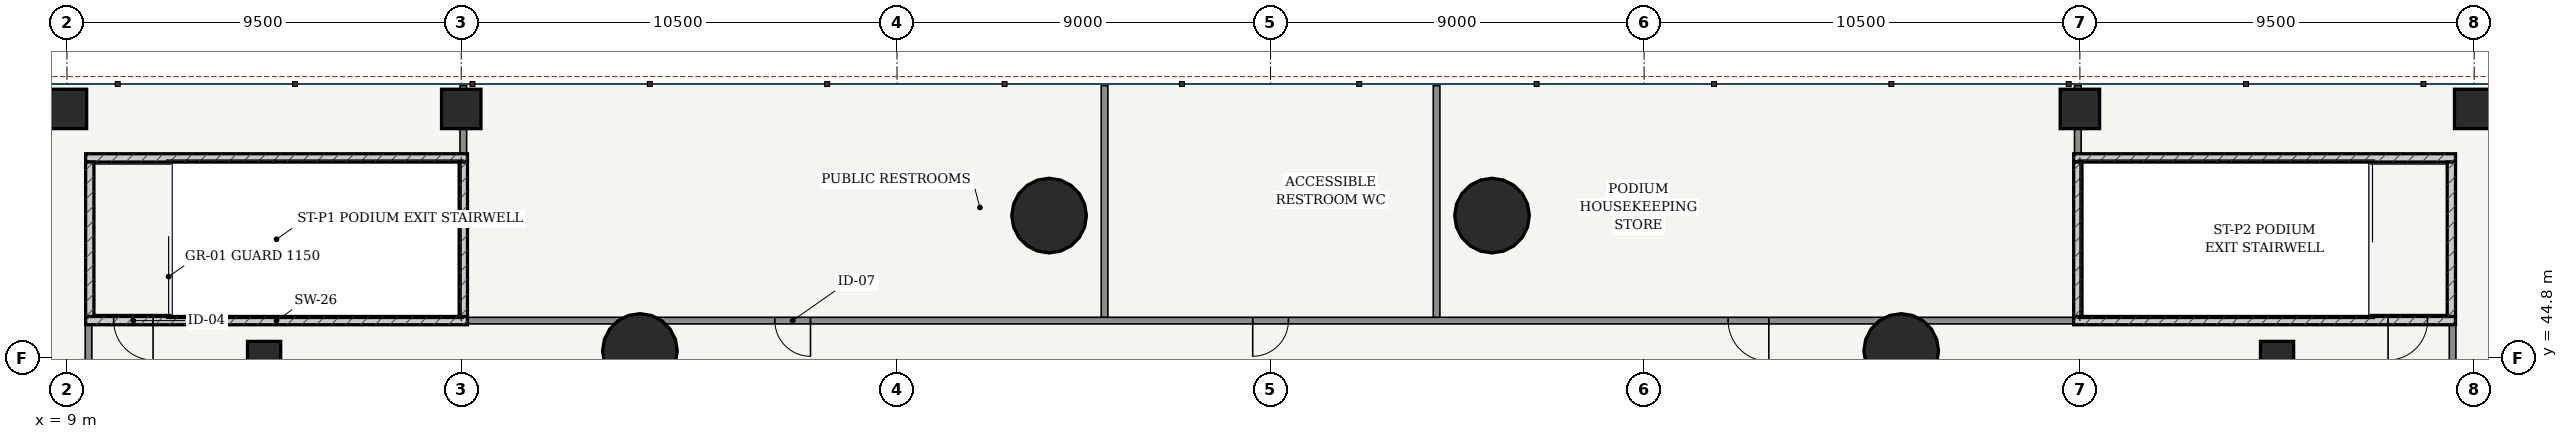
"""IFC4 building model, lengths in metres.
Left out: names, types, materials, properties, quantities, classifications, styles, units other than length and angle.
Written with IfcOpenShell. Run it as: python <this file> out.ifc"""

import sys

from ifc_helpers import new_model, si_unit, direction, frame, frame_2d, origin, origin_2d, place, context, subcontext, project, spatial, rectangle, hollow_circle, extrude, source, transform, mapped, element, fill, save


model = new_model("IFC4")
c1 = context("Model", 3, precision=1e-05, world=origin(), true_north=direction((-0.2419218956, 0.970295726276)))
c2 = subcontext(c1, "Body", "Model", "MODEL_VIEW")
j1 = project(units=[si_unit("LENGTHUNIT", "METRE"), si_unit("PLANEANGLEUNIT", "RADIAN")], contexts=[c1])
p1 = place(None, origin())
s1 = spatial("IfcSite", under=j1, at=p1, CompositionType="ELEMENT")
p2 = place(p1, origin())
s2 = spatial("IfcBuilding", under=s1, at=p2, CompositionType="ELEMENT")
p3 = place(p2, frame((0.0, 0.0, 18.9)))
s3 = spatial("IfcBuildingStorey", under=s2, at=p3, CompositionType="ELEMENT", Elevation=18.9)
p4 = place(p3, frame((9.45, 45.7, 0.0), z_axis=(0.0, 0.0, 1.0), x_axis=(1.0, 0.0, 0.0)))
e1 = element("IfcWall", 1, at=p4, inside=s3, PredefinedType="SOLIDWALL", context=c2, shape_type="SweptSolid", body=[
    extrude(rectangle(XDim=9.2, YDim=0.2, at=frame_2d((4.6, 0.0))), origin(), (0.0, 0.0, 1.0), 4.82),
])
p5 = place(p4, frame((0.675, 0.0, 0.0)))
e2 = element("IfcOpeningElement", 2, at=p5, cuts=e1, PredefinedType="OPENING", context=c2, shape_type="SweptSolid", body=[
    extrude(rectangle(XDim=0.95, YDim=2.15, at=frame_2d((0.475, 1.075))), frame((0.0, 0.11, 0.0), z_axis=(0.0, -1.0, 0.0), x_axis=(1.0, 0.0, 0.0)), (0.0, 0.0, 1.0), 0.22),
])
p6 = place(p3, frame((9.45, 49.62, 0.0), z_axis=(0.0, 0.0, 1.0), x_axis=(1.0, 0.0, 0.0)))
e3 = element("IfcWall", 3, at=p6, inside=s3, PredefinedType="SOLIDWALL", context=c2, shape_type="SweptSolid", body=[
    extrude(rectangle(XDim=9.2, YDim=0.2, at=frame_2d((4.6, 0.0))), origin(), (0.0, 0.0, 1.0), 4.82),
])
for number, where, z_axis, x_axis in (
    (4, (9.55, 45.8, 0.0), (0.0, 0.0, 1.0), (0.0, 1.0, 0.0)),
    (5, (18.55, 45.8, 0.0), (0.0, 0.0, 1.0), (0.0, 1.0, 0.0)),
):
    element("IfcWall", number, at=place(p3, frame(where, z_axis=z_axis, x_axis=x_axis)), inside=s3, PredefinedType="SOLIDWALL", context=c2, shape_type="SweptSolid", body=[
        extrude(rectangle(XDim=3.72, YDim=0.2, at=frame_2d((1.86, 0.0))), origin(), (0.0, 0.0, 1.0), 4.82),
    ])
p7 = place(p3, frame((57.35, 45.7, 0.0), z_axis=(0.0, 0.0, 1.0), x_axis=(1.0, 0.0, 0.0)))
e6 = element("IfcWall", 6, at=p7, inside=s3, PredefinedType="SOLIDWALL", context=c2, shape_type="SweptSolid", body=[
    extrude(rectangle(XDim=9.2, YDim=0.2, at=frame_2d((4.6, 0.0))), origin(), (0.0, 0.0, 1.0), 4.82),
])
p8 = place(p7, frame((7.575, 0.0, 0.0)))
e7 = element("IfcOpeningElement", 7, at=p8, cuts=e6, PredefinedType="OPENING", context=c2, shape_type="SweptSolid", body=[
    extrude(rectangle(XDim=0.95, YDim=2.15, at=frame_2d((0.475, 1.075))), frame((0.0, 0.11, 0.0), z_axis=(0.0, -1.0, 0.0), x_axis=(1.0, 0.0, 0.0)), (0.0, 0.0, 1.0), 0.22),
])
p9 = place(p3, frame((57.35, 49.62, 0.0), z_axis=(0.0, 0.0, 1.0), x_axis=(1.0, 0.0, 0.0)))
e8 = element("IfcWall", 8, at=p9, inside=s3, PredefinedType="SOLIDWALL", context=c2, shape_type="SweptSolid", body=[
    extrude(rectangle(XDim=9.2, YDim=0.2, at=frame_2d((4.6, 0.0))), origin(), (0.0, 0.0, 1.0), 4.82),
])
for number, where, z_axis, x_axis in (
    (9, (57.45, 45.8, 0.0), (0.0, 0.0, 1.0), (0.0, 1.0, 0.0)),
    (10, (66.45, 45.8, 0.0), (0.0, 0.0, 1.0), (0.0, 1.0, 0.0)),
):
    element("IfcWall", number, at=place(p3, frame(where, z_axis=z_axis, x_axis=x_axis)), inside=s3, PredefinedType="SOLIDWALL", context=c2, shape_type="SweptSolid", body=[
        extrude(rectangle(XDim=3.72, YDim=0.2, at=frame_2d((1.86, 0.0))), origin(), (0.0, 0.0, 1.0), 4.82),
    ])
for number, where, z_axis, x_axis in (
    (11, (53.195, 44.968, 0.0), (0.0, 0.0, 1.0), (1.0, 0.0, 0.0)),
    (12, (43.336, 48.23, 0.0), (0.0, 0.0, 1.0), (1.0, 0.0, 0.0)),
    (13, (32.664, 48.23, 0.0), (0.0, 0.0, 1.0), (1.0, 0.0, 0.0)),
    (14, (22.805, 44.968, 0.0), (0.0, 0.0, 1.0), (1.0, 0.0, 0.0)),
):
    element("IfcColumn", number, at=place(p3, frame(where, z_axis=z_axis, x_axis=x_axis)), inside=s3, PredefinedType="COLUMN", context=c2, shape_type="SweptSolid", body=[
        extrude(hollow_circle(Radius=0.9, WallThickness=0.055, at=origin_2d()), origin(), (0.0, 0.0, 1.0), 5.1),
    ])
for number, where, z_axis, x_axis in (
    (15, (9.0, 50.8, 0.0), (0.0, 0.0, 1.0), (1.0, 0.0, 0.0)),
    (16, (18.5, 50.8, 0.0), (0.0, 0.0, 1.0), (1.0, 0.0, 0.0)),
    (17, (57.5, 50.8, 0.0), (0.0, 0.0, 1.0), (1.0, 0.0, 0.0)),
    (18, (67.0, 50.8, 0.0), (0.0, 0.0, 1.0), (1.0, 0.0, 0.0)),
):
    element("IfcColumn", number, at=place(p3, frame(where, z_axis=z_axis, x_axis=x_axis)), inside=s3, PredefinedType="COLUMN", context=c2, shape_type="SweptSolid", body=[
        extrude(rectangle(XDim=0.95, YDim=0.95, at=origin_2d()), origin(), (0.0, 0.0, 1.0), 5.1),
    ])
for number, where, z_axis, x_axis in (
    (19, (13.75, 44.8, -0.45), (0.0, 0.0, 1.0), (1.0, 0.0, 0.0)),
    (20, (62.25, 44.8, -0.45), (0.0, 0.0, 1.0), (1.0, 0.0, 0.0)),
):
    element("IfcColumn", number, at=place(p3, frame(where, z_axis=z_axis, x_axis=x_axis)), inside=s3, PredefinedType="COLUMN", context=c2, shape_type="SweptSolid", body=[
        extrude(rectangle(XDim=0.8, YDim=0.8, at=origin_2d()), origin(), (0.0, 0.0, 1.0), 5.55),
    ])
for number, where, z_axis, x_axis in (
    (21, (9.52, 36.92, 0.0), (0.0, 0.0, 1.0), (0.0, 1.0, 0.0)),
    (22, (66.48, 36.92, 0.0), (0.0, 0.0, 1.0), (0.0, 1.0, 0.0)),
):
    element("IfcWall", number, at=place(p3, frame(where, z_axis=z_axis, x_axis=x_axis)), inside=s3, PredefinedType="PARTITIONING", context=c2, shape_type="SweptSolid", body=[
        extrude(rectangle(XDim=8.78, YDim=0.16, at=frame_2d((4.39, 0.0))), origin(), (0.0, 0.0, 1.0), 4.82),
    ])
p10 = place(p3, frame((18.55, 45.7, 0.0), z_axis=(0.0, 0.0, 1.0), x_axis=(1.0, 0.0, 0.0)))
e23 = element("IfcWall", 23, at=p10, inside=s3, PredefinedType="PARTITIONING", context=c2, shape_type="SweptSolid", body=[
    extrude(rectangle(XDim=38.9, YDim=0.16, at=frame_2d((19.45, 0.0))), origin(), (0.0, 0.0, 1.0), 4.188),
])
p11 = place(p10, frame((7.505, 0.0, 0.0)))
e24 = element("IfcOpeningElement", 24, at=p11, cuts=e23, PredefinedType="OPENING", context=c2, shape_type="SweptSolid", body=[
    extrude(rectangle(XDim=0.86, YDim=2.1, at=frame_2d((0.43, 1.05))), frame((0.0, 0.09, 0.0), z_axis=(0.0, -1.0, 0.0), x_axis=(1.0, 0.0, 0.0)), (0.0, 0.0, 1.0), 0.18),
])
p12 = place(p10, frame((19.02, 0.0, 0.0)))
e25 = element("IfcOpeningElement", 25, at=p12, cuts=e23, PredefinedType="OPENING", context=c2, shape_type="SweptSolid", body=[
    extrude(rectangle(XDim=0.86, YDim=2.1, at=frame_2d((0.43, 1.05))), frame((0.0, 0.09, 0.0), z_axis=(0.0, -1.0, 0.0), x_axis=(1.0, 0.0, 0.0)), (0.0, 0.0, 1.0), 0.18),
])
p13 = place(p10, frame((30.475, 0.0, 0.0)))
e26 = element("IfcOpeningElement", 26, at=p13, cuts=e23, PredefinedType="OPENING", context=c2, shape_type="SweptSolid", body=[
    extrude(rectangle(XDim=0.98, YDim=2.2, at=frame_2d((0.49, 1.1))), frame((0.0, 0.09, 0.0), z_axis=(0.0, -1.0, 0.0), x_axis=(1.0, 0.0, 0.0)), (0.0, 0.0, 1.0), 0.18),
])
for number, where, z_axis, x_axis in (
    (27, (34.0, 45.782, 0.0), (0.0, 0.0, 1.0), (0.0, 1.0, 0.0)),
    (28, (42.0, 45.782, 0.0), (0.0, 0.0, 1.0), (0.0, 1.0, 0.0)),
):
    element("IfcWall", number, at=place(p3, frame(where, z_axis=z_axis, x_axis=x_axis)), inside=s3, PredefinedType="PARTITIONING", context=c2, shape_type="SweptSolid", body=[
        extrude(rectangle(XDim=5.578, YDim=0.16, at=frame_2d((2.789, 0.0))), origin(), (0.0, 0.0, 1.0), 4.262),
    ])
for number, where, z_axis, x_axis in (
    (29, (18.55, 49.722, 0.0), (0.0, 0.0, 1.0), (0.0, 1.0, 0.0)),
    (30, (57.45, 49.722, 0.0), (0.0, 0.0, 1.0), (0.0, 1.0, 0.0)),
):
    element("IfcWall", number, at=place(p3, frame(where, z_axis=z_axis, x_axis=x_axis)), inside=s3, PredefinedType="PARTITIONING", context=c2, shape_type="SweptSolid", body=[
        extrude(rectangle(XDim=1.638, YDim=0.16, at=frame_2d((0.819, 0.0))), origin(), (0.0, 0.0, 1.0), 3.855),
    ])
m1 = source(origin(), c2, "Body", "SweptSolid", [
    extrude(rectangle(XDim=0.95, YDim=2.15, at=frame_2d((0.475, 1.075))), frame((0.0, 0.025, 0.0), z_axis=(0.0, -1.0, 0.0), x_axis=(1.0, 0.0, 0.0)), (0.0, 0.0, 1.0), 0.05),
])
p14 = place(p5, frame((0.95, 0.0, 0.0), z_axis=(0.0, 0.0, 1.0), x_axis=(-1.0, 0.0, 0.0)))
e31 = element("IfcDoor", 31, at=p14, inside=s3, OperationType="SINGLE_SWING_LEFT", PredefinedType="DOOR", context=c2, shape_type="MappedRepresentation", body=[
    mapped(m1, transform((0.0, 0.0, 0.0), scale=1.0)),
])
fill(e2, e31)
p15 = place(p8, frame((0.95, 0.0, 0.0), z_axis=(0.0, 0.0, 1.0), x_axis=(-1.0, 0.0, 0.0)))
e32 = element("IfcDoor", 32, at=p15, inside=s3, OperationType="SINGLE_SWING_RIGHT", PredefinedType="DOOR", context=c2, shape_type="MappedRepresentation", body=[
    mapped(m1, transform((0.0, 0.0, 0.0), scale=1.0)),
])
fill(e7, e32)
m2 = source(origin(), c2, "Body", "SweptSolid", [
    extrude(rectangle(XDim=0.86, YDim=2.1, at=frame_2d((0.43, 1.05))), frame((0.0, 0.025, 0.0), z_axis=(0.0, -1.0, 0.0), x_axis=(1.0, 0.0, 0.0)), (0.0, 0.0, 1.0), 0.05),
])
p16 = place(p11, frame((0.86, 0.0, 0.0), z_axis=(0.0, 0.0, 1.0), x_axis=(-1.0, 0.0, 0.0)))
e33 = element("IfcDoor", 33, at=p16, inside=s3, OperationType="SINGLE_SWING_LEFT", PredefinedType="DOOR", context=c2, shape_type="MappedRepresentation", body=[
    mapped(m2, transform((0.0, 0.0, 0.0), scale=1.0)),
])
fill(e24, e33)
p17 = place(p12, frame((0.86, 0.0, 0.0), z_axis=(0.0, 0.0, 1.0), x_axis=(-1.0, 0.0, 0.0)))
e34 = element("IfcDoor", 34, at=p17, inside=s3, OperationType="SINGLE_SWING_RIGHT", PredefinedType="DOOR", context=c2, shape_type="MappedRepresentation", body=[
    mapped(m2, transform((0.0, 0.0, 0.0), scale=1.0)),
])
fill(e25, e34)
m3 = source(origin(), c2, "Body", "SweptSolid", [
    extrude(rectangle(XDim=0.98, YDim=2.2, at=frame_2d((0.49, 1.1))), frame((0.0, 0.025, 0.0), z_axis=(0.0, -1.0, 0.0), x_axis=(1.0, 0.0, 0.0)), (0.0, 0.0, 1.0), 0.05),
])
p18 = place(p13, frame((0.98, 0.0, 0.0), z_axis=(0.0, 0.0, 1.0), x_axis=(-1.0, 0.0, 0.0)))
e35 = element("IfcDoor", 35, at=p18, inside=s3, OperationType="SINGLE_SWING_LEFT", PredefinedType="DOOR", context=c2, shape_type="MappedRepresentation", body=[
    mapped(m3, transform((0.0, 0.0, 0.0), scale=1.0)),
])
fill(e26, e35)
save(model, sys.argv[1])
